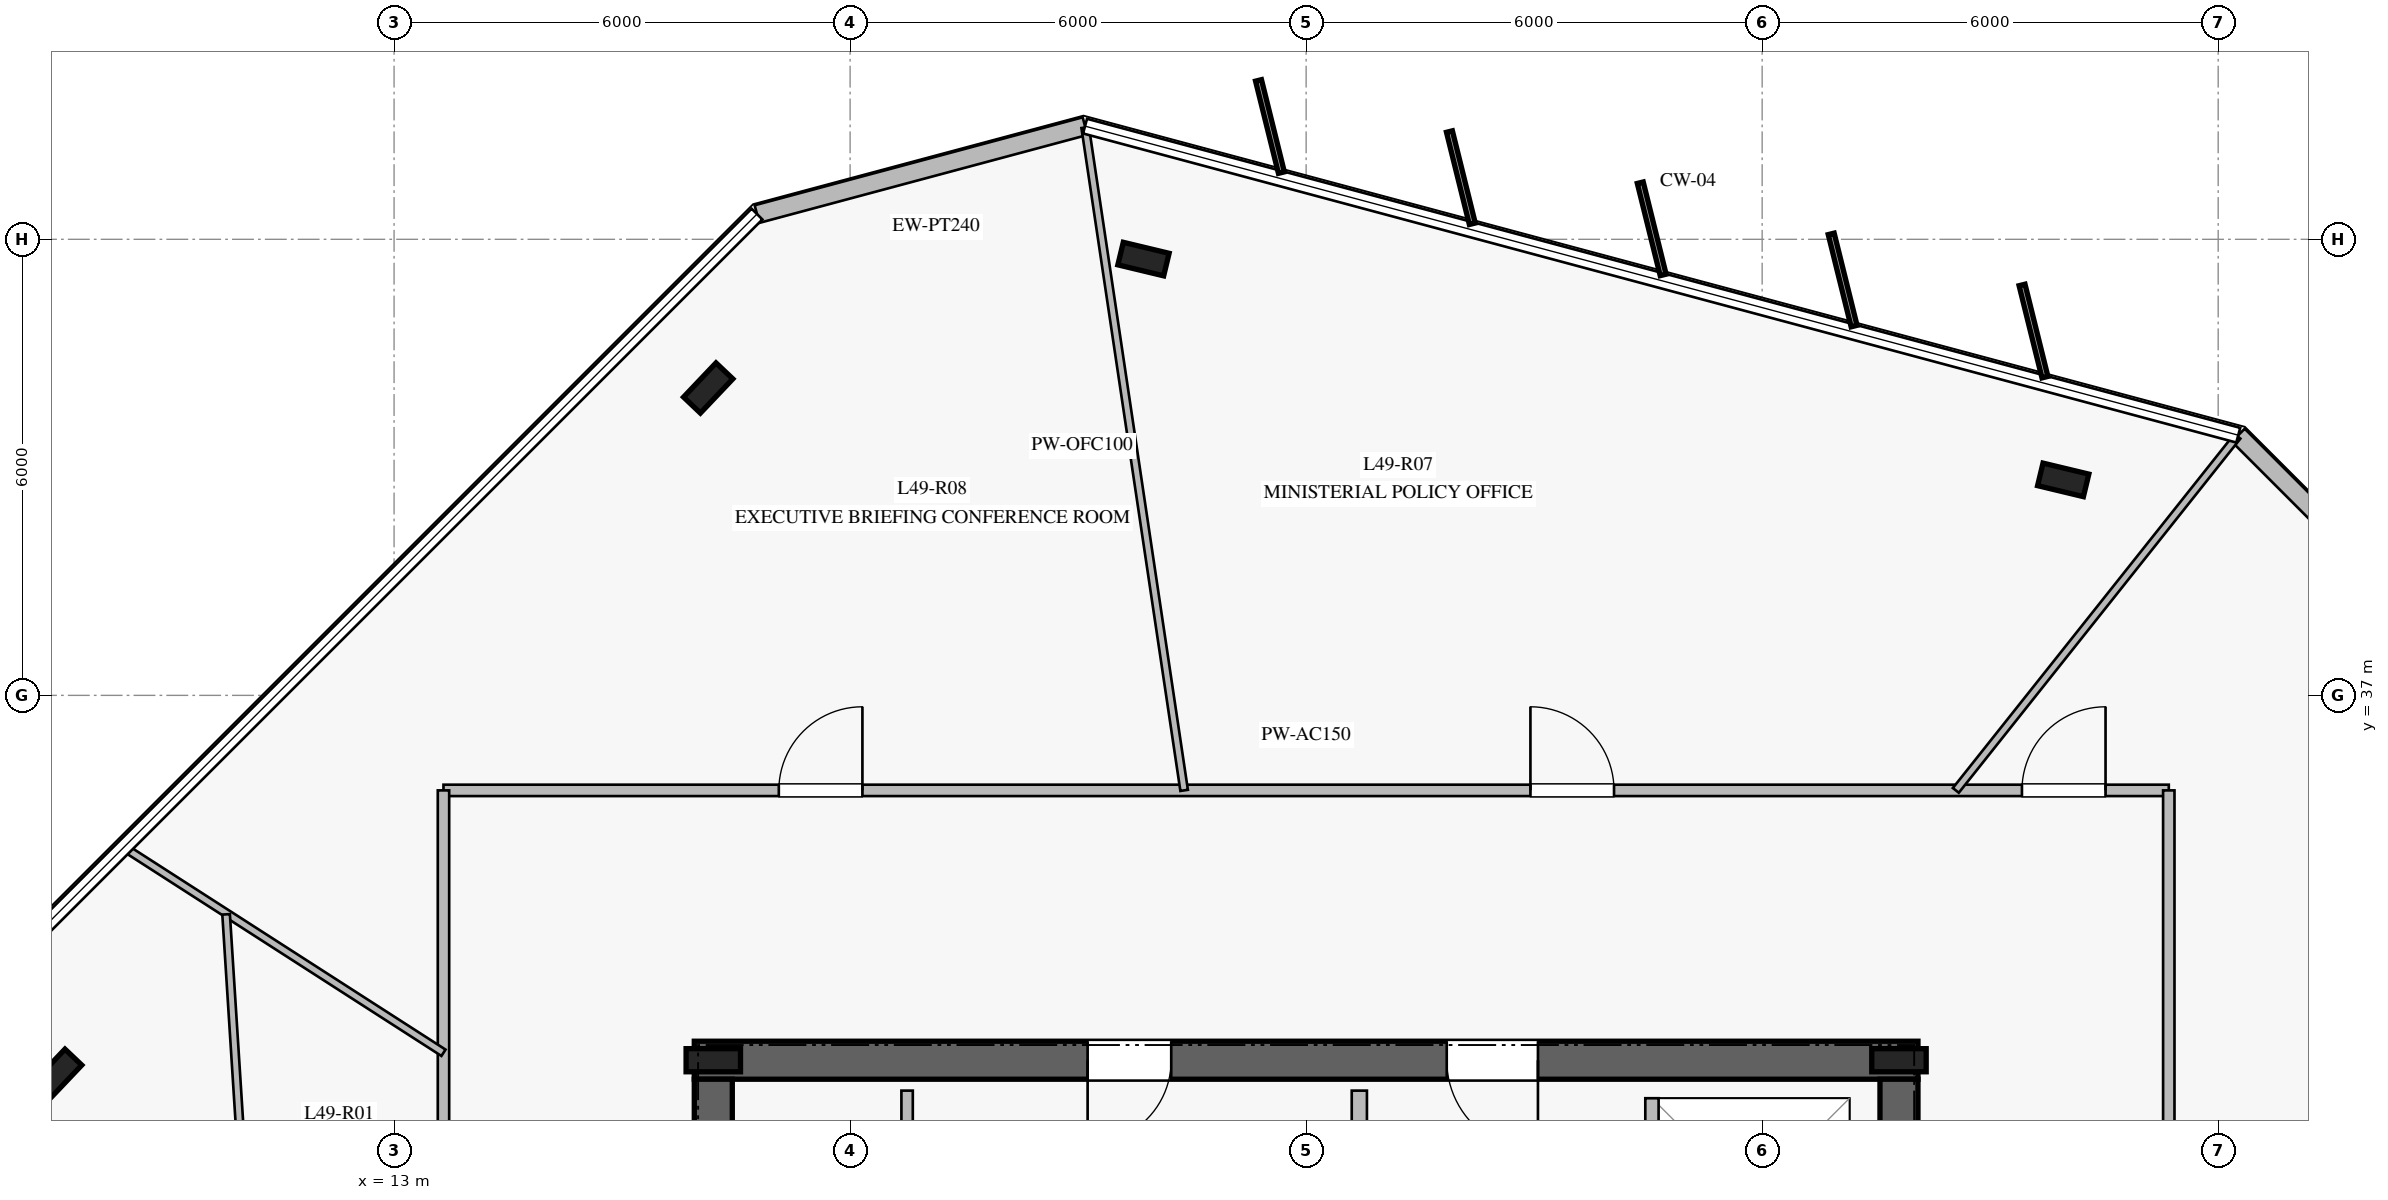
"""IFC4 building model, lengths in metres.
Left out: names, types, materials, properties, quantities, classifications, styles, units other than length and angle.
Written with IfcOpenShell. Run it as: python <this file> out.ifc"""

import sys

from ifc_helpers import new_model, si_unit, direction, frame, frame_2d, origin, origin_2d, place, context, subcontext, project, spatial, rectangle, i_section, extrude, element, fill, save


model = new_model("IFC4")
c1 = context("Model", 3, precision=1e-05, world=origin(), true_north=direction((0.0, 1.0)))
c2 = subcontext(c1, "Body", "Model", "MODEL_VIEW")
j1 = project(units=[si_unit("LENGTHUNIT", "METRE"), si_unit("PLANEANGLEUNIT", "RADIAN")], contexts=[c1])
p1 = place(None, origin())
s1 = spatial("IfcSite", under=j1, at=p1, CompositionType="ELEMENT")
p2 = place(p1, origin())
s2 = spatial("IfcBuilding", under=s1, at=p2, CompositionType="ELEMENT")
p3 = place(p2, frame((0.0, 0.0, 204.8)))
s3 = spatial("IfcBuildingStorey", under=s2, at=p3, CompositionType="ELEMENT", Elevation=204.8)
p4 = place(p3, frame((33.05, 32.2, 0.0), z_axis=(0.0, 0.0, 1.0), x_axis=(-1.0, 0.0, 0.0)))
e1 = element("IfcWall", 1, at=p4, inside=s3, PredefinedType="SHEAR", context=c2, shape_type="SweptSolid", body=[
    extrude(rectangle(XDim=16.1, YDim=0.5, at=frame_2d((8.05, 0.0))), origin(), (0.0, 0.0, 1.0), 3.78),
])
p5 = place(p4, frame((5.0, 0.0, 0.0)))
e2 = element("IfcOpeningElement", 2, at=p5, cuts=e1, PredefinedType="OPENING", context=c2, shape_type="SweptSolid", body=[
    extrude(rectangle(XDim=1.2, YDim=2.25, at=frame_2d((0.6, 1.125))), frame((0.0, 0.26, 0.0), z_axis=(0.0, -1.0, 0.0), x_axis=(1.0, 0.0, 0.0)), (0.0, 0.0, 1.0), 0.52),
])
p6 = place(p4, frame((9.825, 0.0, 0.0)))
e3 = element("IfcOpeningElement", 3, at=p6, cuts=e1, PredefinedType="OPENING", context=c2, shape_type="SweptSolid", body=[
    extrude(rectangle(XDim=1.1, YDim=2.2, at=frame_2d((0.55, 1.1))), frame((0.0, 0.26, 0.0), z_axis=(0.0, -1.0, 0.0), x_axis=(1.0, 0.0, 0.0)), (0.0, 0.0, 1.0), 0.52),
])
p7 = place(p3, frame((17.2, 31.95, 0.0), z_axis=(0.0, 0.0, 1.0), x_axis=(0.0, -1.0, 0.0)))
e4 = element("IfcWall", 4, at=p7, inside=s3, PredefinedType="SHEAR", context=c2, shape_type="SweptSolid", body=[
    extrude(rectangle(XDim=13.9, YDim=0.5, at=frame_2d((6.95, 0.0))), origin(), (0.0, 0.0, 1.0), 3.78),
])
p8 = place(p7, frame((2.1, 0.0, 0.0)))
e5 = element("IfcOpeningElement", 5, at=p8, cuts=e4, PredefinedType="OPENING", context=c2, shape_type="SweptSolid", body=[
    extrude(rectangle(XDim=1.5, YDim=2.2, at=frame_2d((0.75, 1.1))), frame((0.0, 0.26, 0.0), z_axis=(0.0, -1.0, 0.0), x_axis=(1.0, 0.0, 0.0)), (0.0, 0.0, 1.0), 0.52),
])
p9 = place(p3, frame((32.8, 18.05, 0.0), z_axis=(0.0, 0.0, 1.0), x_axis=(0.0, 1.0, 0.0)))
e6 = element("IfcWall", 6, at=p9, inside=s3, PredefinedType="SHEAR", context=c2, shape_type="SweptSolid", body=[
    extrude(rectangle(XDim=13.9, YDim=0.5, at=frame_2d((6.95, 0.0))), origin(), (0.0, 0.0, 1.0), 3.78),
])
for number, where, z_axis, x_axis in (
    (7, (32.8, 32.2, 0.0), (0.0, 0.0, 1.0), (1.0, 0.0, 0.0)),
    (8, (17.2, 32.2, 0.0), (0.0, 0.0, 1.0), (1.0, 0.0, 0.0)),
):
    element("IfcColumn", number, at=place(p3, frame(where, z_axis=z_axis, x_axis=x_axis)), inside=s3, PredefinedType="COLUMN", context=c2, shape_type="SweptSolid", body=[
        extrude(i_section(OverallWidth=0.304, OverallDepth=0.716, WebThickness=0.021, FlangeThickness=0.04, at=origin_2d()), origin(), (0.0, 0.0, 1.0), 4.0),
    ])
for number, where, z_axis, x_axis in (
    (9, (34.961, 39.835, 0.0), (0.0, 0.0, 1.0), (-0.972, 0.233, 0.0)),
    (10, (22.86, 42.74, 0.0), (0.0, 0.0, 1.0), (-0.972, 0.233, 0.0)),
    (11, (17.133, 41.044, 0.0), (0.0, 0.0, 1.0), (0.688, 0.725, 0.0)),
    (12, (8.567, 32.016, 0.0), (0.0, 0.0, 1.0), (0.688, 0.725, 0.0)),
):
    element("IfcColumn", number, at=place(p3, frame(where, z_axis=z_axis, x_axis=x_axis)), inside=s3, PredefinedType="COLUMN", context=c2, shape_type="SweptSolid", body=[
        extrude(i_section(OverallWidth=0.305, OverallDepth=0.62, WebThickness=0.021, FlangeThickness=0.04, at=origin_2d()), origin(), (0.0, 0.0, 1.0), 4.0),
    ])
p10 = place(p3, frame((22.091, 44.489, 0.0), z_axis=(0.0, 0.0, 1.0), x_axis=(-0.965899511245, -0.258917234221, 0.0)))
e13 = element("IfcWall", 13, at=p10, inside=s3, PredefinedType="STANDARD", context=c2, shape_type="SweptSolid", body=[
    extrude(rectangle(XDim=4.469, YDim=0.24, at=frame_2d((2.234, 0.0))), origin(), (0.0, 0.0, 1.0), 3.78),
])
p11 = place(p3, frame((40.423, 37.264, 0.0), z_axis=(0.0, 0.0, 1.0), x_axis=(-0.707106781187, 0.707106781187, 0.0)))
e14 = element("IfcWall", 14, at=p11, inside=s3, PredefinedType="STANDARD", context=c2, shape_type="SweptSolid", body=[
    extrude(rectangle(XDim=4.468, YDim=0.24, at=frame_2d((2.234, 0.0))), origin(), (0.0, 0.0, 1.0), 3.78),
])
p12 = place(p3, frame((25.7, 26.65, 0.0), z_axis=(0.0, 0.0, 1.0), x_axis=(0.0, 1.0, 0.0)))
e15 = element("IfcWall", 15, at=p12, inside=s3, PredefinedType="PARTITIONING", context=c2, shape_type="SweptSolid", body=[
    extrude(rectangle(XDim=5.15, YDim=0.2, at=frame_2d((2.575, 0.0))), origin(), (0.0, 0.0, 1.0), 3.78),
])
p13 = place(p3, frame((19.75, 29.39, 0.0), z_axis=(0.0, 0.0, 1.0), x_axis=(0.0, 1.0, 0.0)))
e16 = element("IfcWall", 16, at=p13, inside=s3, PredefinedType="PARTITIONING", context=c2, shape_type="SweptSolid", body=[
    extrude(rectangle(XDim=2.41, YDim=0.15, at=frame_2d((1.205, 0.0))), origin(), (0.0, 0.0, 1.0), 3.78),
])
p14 = place(p3, frame((29.55, 29.1, 0.0), z_axis=(0.0, 0.0, 1.0), x_axis=(0.0, 1.0, 0.0)))
e17 = element("IfcWall", 17, at=p14, inside=s3, PredefinedType="PARTITIONING", context=c2, shape_type="SweptSolid", body=[
    extrude(rectangle(XDim=2.6, YDim=0.175, at=frame_2d((1.3, 0.0))), origin(), (0.0, 0.0, 1.0), 3.78),
])
p15 = place(p14, frame((0.7, 0.0, 0.0)))
e18 = element("IfcOpeningElement", 18, at=p15, cuts=e17, PredefinedType="OPENING", context=c2, shape_type="SweptSolid", body=[
    extrude(rectangle(XDim=1.2, YDim=2.2, at=frame_2d((0.6, 1.1))), frame((0.0, 0.098, 0.0), z_axis=(0.0, -1.0, 0.0), x_axis=(1.0, 0.0, 0.0)), (0.0, 0.0, 1.0), 0.195),
])
p16 = place(p3, frame((13.65, 35.75, 0.0), z_axis=(0.0, 0.0, 1.0), x_axis=(1.0, 0.0, 0.0)))
e19 = element("IfcWall", 19, at=p16, inside=s3, PredefinedType="PARTITIONING", context=c2, shape_type="SweptSolid", body=[
    extrude(rectangle(XDim=22.7, YDim=0.15, at=frame_2d((11.35, 0.0))), origin(), (0.0, 0.0, 1.0), 3.05),
])
p17 = place(p16, frame((20.768, 0.0, 0.0)))
e20 = element("IfcOpeningElement", 20, at=p17, cuts=e19, PredefinedType="OPENING", context=c2, shape_type="SweptSolid", body=[
    extrude(rectangle(XDim=1.1, YDim=2.2, at=frame_2d((0.55, 1.1))), frame((0.0, 0.085, 0.0), z_axis=(0.0, -1.0, 0.0), x_axis=(1.0, 0.0, 0.0)), (0.0, 0.0, 1.0), 0.17),
])
p18 = place(p16, frame((14.301, 0.0, 0.0)))
e21 = element("IfcOpeningElement", 21, at=p18, cuts=e19, PredefinedType="OPENING", context=c2, shape_type="SweptSolid", body=[
    extrude(rectangle(XDim=1.1, YDim=2.2, at=frame_2d((0.55, 1.1))), frame((0.0, 0.085, 0.0), z_axis=(0.0, -1.0, 0.0), x_axis=(1.0, 0.0, 0.0)), (0.0, 0.0, 1.0), 0.17),
])
p19 = place(p16, frame((4.412, 0.0, 0.0)))
e22 = element("IfcOpeningElement", 22, at=p19, cuts=e19, PredefinedType="OPENING", context=c2, shape_type="SweptSolid", body=[
    extrude(rectangle(XDim=1.1, YDim=2.2, at=frame_2d((0.55, 1.1))), frame((0.0, 0.085, 0.0), z_axis=(0.0, -1.0, 0.0), x_axis=(1.0, 0.0, 0.0)), (0.0, 0.0, 1.0), 0.17),
])
p20 = place(p3, frame((36.35, 35.75, 0.0), z_axis=(0.0, 0.0, 1.0), x_axis=(0.0, -1.0, 0.0)))
e23 = element("IfcWall", 23, at=p20, inside=s3, PredefinedType="PARTITIONING", context=c2, shape_type="SweptSolid", body=[
    extrude(rectangle(XDim=21.5, YDim=0.15, at=frame_2d((10.75, 0.0))), origin(), (0.0, 0.0, 1.0), 3.05),
])
p21 = place(p20, frame((14.717, 0.0, 0.0)))
e24 = element("IfcOpeningElement", 24, at=p21, cuts=e23, PredefinedType="OPENING", context=c2, shape_type="SweptSolid", body=[
    extrude(rectangle(XDim=1.1, YDim=2.2, at=frame_2d((0.55, 1.1))), frame((0.0, 0.085, 0.0), z_axis=(0.0, -1.0, 0.0), x_axis=(1.0, 0.0, 0.0)), (0.0, 0.0, 1.0), 0.17),
])
p22 = place(p3, frame((13.65, 14.25, 0.0), z_axis=(0.0, 0.0, 1.0), x_axis=(0.0, 1.0, 0.0)))
e25 = element("IfcWall", 25, at=p22, inside=s3, PredefinedType="PARTITIONING", context=c2, shape_type="SweptSolid", body=[
    extrude(rectangle(XDim=21.5, YDim=0.15, at=frame_2d((10.75, 0.0))), origin(), (0.0, 0.0, 1.0), 3.02),
])
p23 = place(p22, frame((11.331, 0.0, 0.0)))
e26 = element("IfcOpeningElement", 26, at=p23, cuts=e25, PredefinedType="OPENING", context=c2, shape_type="SweptSolid", body=[
    extrude(rectangle(XDim=1.1, YDim=2.2, at=frame_2d((0.55, 1.1))), frame((0.0, 0.085, 0.0), z_axis=(0.0, -1.0, 0.0), x_axis=(1.0, 0.0, 0.0)), (0.0, 0.0, 1.0), 0.17),
])
p24 = place(p3, frame((23.395, 35.75, 0.0), z_axis=(0.0, 0.0, 1.0), x_axis=(-0.14765939102, 0.989038272386, 0.0)))
e27 = element("IfcWall", 27, at=p24, inside=s3, PredefinedType="MOVABLE", context=c2, shape_type="SweptSolid", body=[
    extrude(rectangle(XDim=8.818, YDim=0.1, at=frame_2d((4.409, 0.0))), origin(), (0.0, 0.0, 1.0), 3.18),
])
p25 = place(p3, frame((13.65, 32.298, 0.0), z_axis=(0.0, 0.0, 1.0), x_axis=(-0.841207133727, 0.540713009061, 0.0)))
e28 = element("IfcWall", 28, at=p25, inside=s3, PredefinedType="MOVABLE", context=c2, shape_type="SweptSolid", body=[
    extrude(rectangle(XDim=4.982, YDim=0.1, at=frame_2d((2.491, 0.0))), origin(), (0.0, 0.0, 1.0), 3.05),
])
p26 = place(p3, frame((33.548, 35.75, 0.0), z_axis=(0.0, 0.0, 1.0), x_axis=(0.622406520703, 0.782694143958, 0.0)))
e29 = element("IfcWall", 29, at=p26, inside=s3, PredefinedType="MOVABLE", context=c2, shape_type="SweptSolid", body=[
    extrude(rectangle(XDim=5.952, YDim=0.1, at=frame_2d((2.976, 0.0))), origin(), (0.0, 0.0, 1.0), 3.18),
])
p27 = place(p3, frame((10.79, 34.119, 0.0), z_axis=(0.0, 0.0, 1.0), x_axis=(0.063709221748, -0.997968504044, 0.0)))
e30 = element("IfcWall", 30, at=p27, inside=s3, PredefinedType="MOVABLE", context=c2, shape_type="SweptSolid", body=[
    extrude(rectangle(XDim=14.834, YDim=0.1, at=frame_2d((7.417, 0.0))), origin(), (0.0, 0.0, 1.0), 3.02),
])
p28 = place(p27, frame((6.917, 0.0, 0.0)))
e31 = element("IfcOpeningElement", 31, at=p28, cuts=e30, PredefinedType="OPENING", context=c2, shape_type="SweptSolid", body=[
    extrude(rectangle(XDim=1.0, YDim=2.15, at=frame_2d((0.5, 1.075))), frame((0.0, 0.06, 0.0), z_axis=(0.0, -1.0, 0.0), x_axis=(1.0, 0.0, 0.0)), (0.0, 0.0, 1.0), 0.12),
])
p29 = place(p5, origin())
e32 = element("IfcDoor", 32, at=p29, inside=s3, OperationType="SINGLE_SWING_LEFT", PredefinedType="DOOR", context=c2, shape_type="SweptSolid", body=[
    extrude(rectangle(XDim=1.2, YDim=2.25, at=frame_2d((0.6, 1.125))), frame((0.0, 0.025, 0.0), z_axis=(0.0, -1.0, 0.0), x_axis=(1.0, 0.0, 0.0)), (0.0, 0.0, 1.0), 0.05),
])
fill(e2, e32)
p30 = place(p6, origin())
e33 = element("IfcDoor", 33, at=p30, inside=s3, OperationType="SINGLE_SWING_RIGHT", PredefinedType="DOOR", context=c2, shape_type="SweptSolid", body=[
    extrude(rectangle(XDim=1.1, YDim=2.2, at=frame_2d((0.55, 1.1))), frame((0.0, 0.025, 0.0), z_axis=(0.0, -1.0, 0.0), x_axis=(1.0, 0.0, 0.0)), (0.0, 0.0, 1.0), 0.05),
])
fill(e3, e33)
p31 = place(p17, origin())
e34 = element("IfcDoor", 34, at=p31, inside=s3, OperationType="SINGLE_SWING_RIGHT", PredefinedType="DOOR", context=c2, shape_type="SweptSolid", body=[
    extrude(rectangle(XDim=1.1, YDim=2.2, at=frame_2d((0.55, 1.1))), frame((0.0, 0.025, 0.0), z_axis=(0.0, -1.0, 0.0), x_axis=(1.0, 0.0, 0.0)), (0.0, 0.0, 1.0), 0.05),
])
fill(e20, e34)
p32 = place(p18, origin())
e35 = element("IfcDoor", 35, at=p32, inside=s3, OperationType="SINGLE_SWING_LEFT", PredefinedType="DOOR", context=c2, shape_type="SweptSolid", body=[
    extrude(rectangle(XDim=1.1, YDim=2.2, at=frame_2d((0.55, 1.1))), frame((0.0, 0.025, 0.0), z_axis=(0.0, -1.0, 0.0), x_axis=(1.0, 0.0, 0.0)), (0.0, 0.0, 1.0), 0.05),
])
fill(e21, e35)
p33 = place(p19, origin())
e36 = element("IfcDoor", 36, at=p33, inside=s3, OperationType="SINGLE_SWING_RIGHT", PredefinedType="DOOR", context=c2, shape_type="SweptSolid", body=[
    extrude(rectangle(XDim=1.1, YDim=2.2, at=frame_2d((0.55, 1.1))), frame((0.0, 0.025, 0.0), z_axis=(0.0, -1.0, 0.0), x_axis=(1.0, 0.0, 0.0)), (0.0, 0.0, 1.0), 0.05),
])
fill(e22, e36)
save(model, sys.argv[1])
